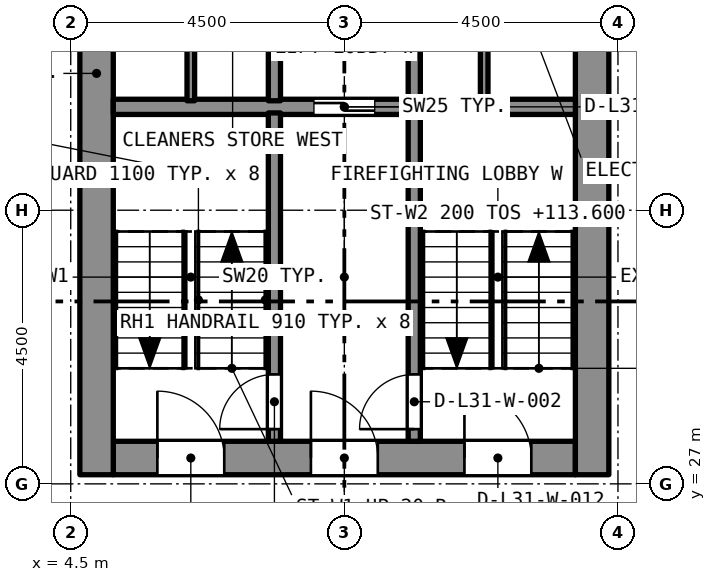
"""IFC4 building model, lengths in metres.
Left out: names, types, materials, properties, quantities, classifications, styles, units other than length and angle.
Written with IfcOpenShell. Run it as: python <this file> out.ifc"""

import sys

from ifc_helpers import new_model, si_unit, direction, frame, frame_2d, origin, place, context, subcontext, project, spatial, rectangle, extrude, element, fill, save


model = new_model("IFC4")
c1 = context("Model", 3, precision=1e-05, world=origin(), true_north=direction((0.0, 1.0)))
c2 = subcontext(c1, "Body", "Model", "MODEL_VIEW")
j1 = project(units=[si_unit("LENGTHUNIT", "METRE"), si_unit("PLANEANGLEUNIT", "RADIAN")], contexts=[c1])
p1 = place(None, origin())
s1 = spatial("IfcSite", under=j1, at=p1, CompositionType="ELEMENT")
p2 = place(p1, origin())
s2 = spatial("IfcBuilding", under=s1, at=p2, CompositionType="ELEMENT")
p3 = place(p2, frame((0.0, 0.0, 112.0)))
s3 = spatial("IfcBuildingStorey", under=s2, at=p3, CompositionType="ELEMENT", Elevation=112.0)
p4 = place(p3, frame((5.2, 27.425, 0.0), z_axis=(0.0, 0.0, 1.0), x_axis=(1.0, 0.0, 0.0)))
e1 = element("IfcWall", 1, at=p4, inside=s3, PredefinedType="SOLIDWALL", context=c2, shape_type="SweptSolid", body=[
    extrude(rectangle(XDim=7.6, YDim=0.55, at=frame_2d((3.8, 0.0))), origin(), (0.0, 0.0, 1.0), 3.2),
])
p5 = place(p4, frame((0.725, 0.0, 0.0)))
e2 = element("IfcOpeningElement", 2, at=p5, cuts=e1, PredefinedType="OPENING", context=c2, shape_type="SweptSolid", body=[
    extrude(rectangle(XDim=1.1, YDim=2.1, at=frame_2d((0.55, 1.05))), frame((0.0, 0.285, 0.0), z_axis=(0.0, -1.0, 0.0), x_axis=(1.0, 0.0, 0.0)), (0.0, 0.0, 1.0), 0.57),
])
p6 = place(p4, frame((3.25, 0.0, 0.0)))
e3 = element("IfcOpeningElement", 3, at=p6, cuts=e1, PredefinedType="OPENING", context=c2, shape_type="SweptSolid", body=[
    extrude(rectangle(XDim=1.1, YDim=2.1, at=frame_2d((0.55, 1.05))), frame((0.0, 0.285, 0.0), z_axis=(0.0, -1.0, 0.0), x_axis=(1.0, 0.0, 0.0)), (0.0, 0.0, 1.0), 0.57),
])
p7 = place(p4, frame((5.775, 0.0, 0.0)))
e4 = element("IfcOpeningElement", 4, at=p7, cuts=e1, PredefinedType="OPENING", context=c2, shape_type="SweptSolid", body=[
    extrude(rectangle(XDim=1.1, YDim=2.1, at=frame_2d((0.55, 1.05))), frame((0.0, 0.285, 0.0), z_axis=(0.0, -1.0, 0.0), x_axis=(1.0, 0.0, 0.0)), (0.0, 0.0, 1.0), 0.57),
])
p8 = place(p3, frame((4.925, 27.15, 0.0), z_axis=(0.0, 0.0, 1.0), x_axis=(0.0, 1.0, 0.0)))
e5 = element("IfcWall", 5, at=p8, inside=s3, PredefinedType="SOLIDWALL", context=c2, shape_type="SweptSolid", body=[
    extrude(rectangle(XDim=13.2, YDim=0.55, at=frame_2d((6.6, 0.0))), origin(), (0.0, 0.0, 1.0), 3.2),
])
p9 = place(p8, frame((8.8, 0.0, 0.0)))
e6 = element("IfcOpeningElement", 6, at=p9, cuts=e5, PredefinedType="OPENING", context=c2, shape_type="SweptSolid", body=[
    extrude(rectangle(XDim=1.2, YDim=2.1, at=frame_2d((0.6, 1.05))), frame((0.0, 0.285, 0.0), z_axis=(0.0, -1.0, 0.0), x_axis=(1.0, 0.0, 0.0)), (0.0, 0.0, 1.0), 0.57),
])
p10 = place(p3, frame((13.075, 27.15, 0.0), z_axis=(0.0, 0.0, 1.0), x_axis=(0.0, 1.0, 0.0)))
e7 = element("IfcWall", 7, at=p10, inside=s3, PredefinedType="SOLIDWALL", context=c2, shape_type="SweptSolid", body=[
    extrude(rectangle(XDim=13.2, YDim=0.55, at=frame_2d((6.6, 0.0))), origin(), (0.0, 0.0, 1.0), 3.2),
])
p11 = place(p10, frame((10.95, 0.0, 0.0)))
e8 = element("IfcOpeningElement", 8, at=p11, cuts=e7, PredefinedType="OPENING", context=c2, shape_type="SweptSolid", body=[
    extrude(rectangle(XDim=1.1, YDim=2.1, at=frame_2d((0.55, 1.05))), frame((0.0, 0.285, 0.0), z_axis=(0.0, -1.0, 0.0), x_axis=(1.0, 0.0, 0.0)), (0.0, 0.0, 1.0), 0.57),
])
p12 = place(p10, frame((8.8, 0.0, 0.0)))
e9 = element("IfcOpeningElement", 9, at=p12, cuts=e7, PredefinedType="OPENING", context=c2, shape_type="SweptSolid", body=[
    extrude(rectangle(XDim=1.2, YDim=2.1, at=frame_2d((0.6, 1.05))), frame((0.0, 0.285, 0.0), z_axis=(0.0, -1.0, 0.0), x_axis=(1.0, 0.0, 0.0)), (0.0, 0.0, 1.0), 0.57),
])
p13 = place(p3, frame((5.2, 33.2, 0.0), z_axis=(0.0, 0.0, 1.0), x_axis=(1.0, 0.0, 0.0)))
e10 = element("IfcWall", 10, at=p13, inside=s3, PredefinedType="SOLIDWALL", context=c2, shape_type="SweptSolid", body=[
    extrude(rectangle(XDim=7.6, YDim=0.25, at=frame_2d((3.8, 0.0))), origin(), (0.0, 0.0, 1.0), 2.9),
])
p14 = place(p13, frame((3.3, 0.0, 0.0)))
e11 = element("IfcOpeningElement", 11, at=p14, cuts=e10, PredefinedType="OPENING", context=c2, shape_type="SweptSolid", body=[
    extrude(rectangle(XDim=1.0, YDim=2.1, at=frame_2d((0.5, 1.05))), frame((0.0, 0.135, 0.0), z_axis=(0.0, -1.0, 0.0), x_axis=(1.0, 0.0, 0.0)), (0.0, 0.0, 1.0), 0.27),
])
p15 = place(p3, frame((7.85, 27.7, 0.0), z_axis=(0.0, 0.0, 1.0), x_axis=(0.0, 1.0, 0.0)))
e12 = element("IfcWall", 12, at=p15, inside=s3, PredefinedType="SOLIDWALL", context=c2, shape_type="SweptSolid", body=[
    extrude(rectangle(XDim=5.4, YDim=0.2, at=frame_2d((2.7, 0.0))), origin(), (0.0, 0.0, 1.0), 2.9),
])
p16 = place(p15, frame((0.2, 0.0, 0.0)))
e13 = element("IfcOpeningElement", 13, at=p16, cuts=e12, PredefinedType="OPENING", context=c2, shape_type="SweptSolid", body=[
    extrude(rectangle(XDim=0.9, YDim=2.1, at=frame_2d((0.45, 1.05))), frame((0.0, 0.11, 0.0), z_axis=(0.0, -1.0, 0.0), x_axis=(1.0, 0.0, 0.0)), (0.0, 0.0, 1.0), 0.22),
])
p17 = place(p3, frame((10.15, 27.7, 0.0), z_axis=(0.0, 0.0, 1.0), x_axis=(0.0, 1.0, 0.0)))
e14 = element("IfcWall", 14, at=p17, inside=s3, PredefinedType="SOLIDWALL", context=c2, shape_type="SweptSolid", body=[
    extrude(rectangle(XDim=5.4, YDim=0.2, at=frame_2d((2.7, 0.0))), origin(), (0.0, 0.0, 1.0), 2.9),
])
p18 = place(p17, frame((0.2, 0.0, 0.0)))
e15 = element("IfcOpeningElement", 15, at=p18, cuts=e14, PredefinedType="OPENING", context=c2, shape_type="SweptSolid", body=[
    extrude(rectangle(XDim=0.9, YDim=2.1, at=frame_2d((0.45, 1.05))), frame((0.0, 0.11, 0.0), z_axis=(0.0, -1.0, 0.0), x_axis=(1.0, 0.0, 0.0)), (0.0, 0.0, 1.0), 0.22),
])
for number, where, z_axis, x_axis in (
    (16, (7.85, 33.3, 0.0), (0.0, 0.0, 1.0), (0.0, 1.0, 0.0)),
    (17, (10.15, 33.3, 0.0), (0.0, 0.0, 1.0), (0.0, 1.0, 0.0)),
):
    element("IfcWall", number, at=place(p3, frame(where, z_axis=z_axis, x_axis=x_axis)), inside=s3, PredefinedType="SOLIDWALL", context=c2, shape_type="SweptSolid", body=[
        extrude(rectangle(XDim=2.3, YDim=0.2, at=frame_2d((1.15, 0.0))), origin(), (0.0, 0.0, 1.0), 2.9),
    ])
for number, where, z_axis, x_axis in (
    (18, (6.475, 33.3, 0.0), (0.0, 0.0, 1.0), (0.0, 1.0, 0.0)),
    (19, (11.3, 33.3, 0.0), (0.0, 0.0, 1.0), (0.0, 1.0, 0.0)),
):
    element("IfcWall", number, at=place(p3, frame(where, z_axis=z_axis, x_axis=x_axis)), inside=s3, PredefinedType="PARTITIONING", context=c2, shape_type="SweptSolid", body=[
        extrude(rectangle(XDim=2.3, YDim=0.125, at=frame_2d((1.15, 0.0))), origin(), (0.0, 0.0, 1.0), 2.9),
    ])
p19 = place(p16, origin())
e20 = element("IfcDoor", 20, at=p19, inside=s3, OperationType="SINGLE_SWING_LEFT", PredefinedType="DOOR", context=c2, shape_type="SweptSolid", body=[
    extrude(rectangle(XDim=0.9, YDim=2.1, at=frame_2d((0.45, 1.05))), frame((0.0, 0.025, 0.0), z_axis=(0.0, -1.0, 0.0), x_axis=(1.0, 0.0, 0.0)), (0.0, 0.0, 1.0), 0.05),
])
fill(e13, e20)
p20 = place(p18, origin())
e21 = element("IfcDoor", 21, at=p20, inside=s3, OperationType="SINGLE_SWING_LEFT", PredefinedType="DOOR", context=c2, shape_type="SweptSolid", body=[
    extrude(rectangle(XDim=0.9, YDim=2.1, at=frame_2d((0.45, 1.05))), frame((0.0, 0.025, 0.0), z_axis=(0.0, -1.0, 0.0), x_axis=(1.0, 0.0, 0.0)), (0.0, 0.0, 1.0), 0.05),
])
fill(e15, e21)
p21 = place(p14, origin())
e22 = element("IfcDoor", 22, at=p21, inside=s3, OperationType="SLIDING_TO_LEFT", PredefinedType="DOOR", context=c2, shape_type="SweptSolid", body=[
    extrude(rectangle(XDim=1.0, YDim=2.1, at=frame_2d((0.5, 1.05))), frame((0.0, 0.025, 0.0), z_axis=(0.0, -1.0, 0.0), x_axis=(1.0, 0.0, 0.0)), (0.0, 0.0, 1.0), 0.05),
])
fill(e11, e22)
p22 = place(p5, origin())
e23 = element("IfcDoor", 23, at=p22, inside=s3, OperationType="SINGLE_SWING_LEFT", PredefinedType="DOOR", context=c2, shape_type="SweptSolid", body=[
    extrude(rectangle(XDim=1.1, YDim=2.1, at=frame_2d((0.55, 1.05))), frame((0.0, 0.025, 0.0), z_axis=(0.0, -1.0, 0.0), x_axis=(1.0, 0.0, 0.0)), (0.0, 0.0, 1.0), 0.05),
])
fill(e2, e23)
p23 = place(p6, origin())
e24 = element("IfcDoor", 24, at=p23, inside=s3, OperationType="SINGLE_SWING_LEFT", PredefinedType="DOOR", context=c2, shape_type="SweptSolid", body=[
    extrude(rectangle(XDim=1.1, YDim=2.1, at=frame_2d((0.55, 1.05))), frame((0.0, 0.025, 0.0), z_axis=(0.0, -1.0, 0.0), x_axis=(1.0, 0.0, 0.0)), (0.0, 0.0, 1.0), 0.05),
])
fill(e3, e24)
p24 = place(p7, origin())
e25 = element("IfcDoor", 25, at=p24, inside=s3, OperationType="SINGLE_SWING_LEFT", PredefinedType="DOOR", context=c2, shape_type="SweptSolid", body=[
    extrude(rectangle(XDim=1.1, YDim=2.1, at=frame_2d((0.55, 1.05))), frame((0.0, 0.025, 0.0), z_axis=(0.0, -1.0, 0.0), x_axis=(1.0, 0.0, 0.0)), (0.0, 0.0, 1.0), 0.05),
])
fill(e4, e25)
save(model, sys.argv[1])
